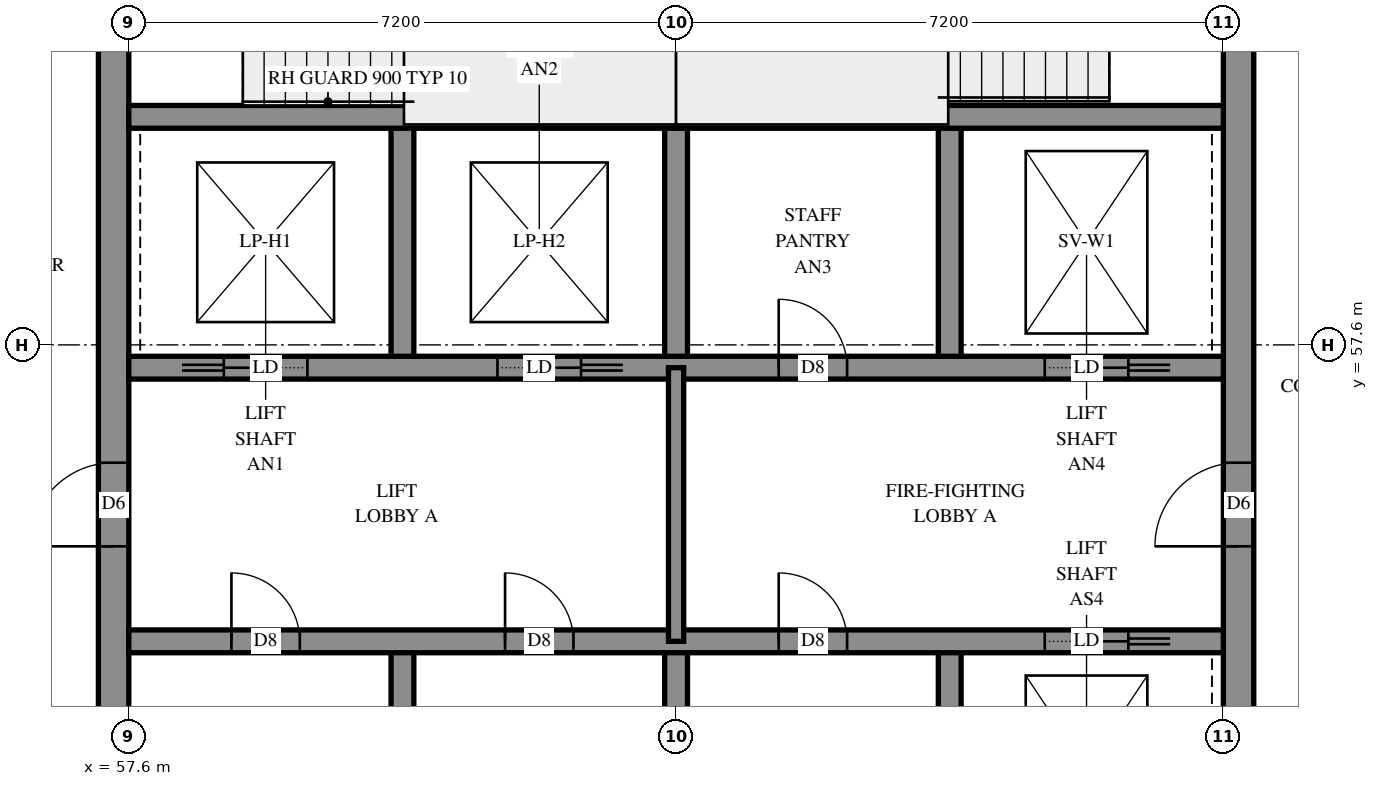
"""IFC4 building model, lengths in metres.
Left out: names, types, materials, properties, quantities, classifications, styles, units other than length and angle.
Written with IfcOpenShell. Run it as: python <this file> out.ifc"""

import sys

from ifc_helpers import new_model, si_unit, direction, frame, frame_2d, origin, place, context, subcontext, project, spatial, rectangle, extrude, element, fill, save


model = new_model("IFC4")
c1 = context("Model", 3, precision=1e-05, world=origin(), true_north=direction((0.0, 1.0)))
c2 = subcontext(c1, "Body", "Model", "MODEL_VIEW")
j1 = project(units=[si_unit("LENGTHUNIT", "METRE"), si_unit("PLANEANGLEUNIT", "RADIAN")], contexts=[c1])
p1 = place(None, origin())
s1 = spatial("IfcSite", under=j1, at=p1, CompositionType="ELEMENT")
p2 = place(p1, origin())
s2 = spatial("IfcBuilding", under=s1, at=p2, CompositionType="ELEMENT")
p3 = place(p2, frame((0.0, 0.0, 243.8)))
s3 = spatial("IfcBuildingStorey", under=s2, at=p3, CompositionType="ELEMENT", Elevation=243.8)
p4 = place(p3, frame((57.4, 50.4, -0.3), z_axis=(0.0, 0.0, 1.0), x_axis=(0.0, 1.0, 0.0)))
e1 = element("IfcWall", 1, at=p4, inside=s3, PredefinedType="SHEAR", context=c2, shape_type="SweptSolid", body=[
    extrude(rectangle(XDim=14.4, YDim=0.4, at=frame_2d((7.2, 0.0))), origin(), (0.0, 0.0, 1.0), 2.7),
])
p5 = place(p4, frame((4.55, 0.0, 0.3)))
e2 = element("IfcOpeningElement", 2, at=p5, cuts=e1, PredefinedType="OPENING", context=c2, shape_type="SweptSolid", body=[
    extrude(rectangle(XDim=1.1, YDim=2.1, at=frame_2d((0.55, 1.05))), frame((0.0, 0.21, 0.0), z_axis=(0.0, -1.0, 0.0), x_axis=(1.0, 0.0, 0.0)), (0.0, 0.0, 1.0), 0.42),
])
p6 = place(p4, frame((11.35, 0.0, 0.3)))
e3 = element("IfcOpeningElement", 3, at=p6, cuts=e1, PredefinedType="OPENING", context=c2, shape_type="SweptSolid", body=[
    extrude(rectangle(XDim=1.1, YDim=2.1, at=frame_2d((0.55, 1.05))), frame((0.0, 0.21, 0.0), z_axis=(0.0, -1.0, 0.0), x_axis=(1.0, 0.0, 0.0)), (0.0, 0.0, 1.0), 0.42),
])
p7 = place(p3, frame((72.2, 50.4, -0.3), z_axis=(0.0, 0.0, 1.0), x_axis=(0.0, 1.0, 0.0)))
e4 = element("IfcWall", 4, at=p7, inside=s3, PredefinedType="SHEAR", context=c2, shape_type="SweptSolid", body=[
    extrude(rectangle(XDim=14.4, YDim=0.4, at=frame_2d((7.2, 0.0))), origin(), (0.0, 0.0, 1.0), 2.7),
])
p8 = place(p7, frame((4.55, 0.0, 0.3)))
e5 = element("IfcOpeningElement", 5, at=p8, cuts=e4, PredefinedType="OPENING", context=c2, shape_type="SweptSolid", body=[
    extrude(rectangle(XDim=1.1, YDim=2.1, at=frame_2d((0.55, 1.05))), frame((0.0, 0.21, 0.0), z_axis=(0.0, -1.0, 0.0), x_axis=(1.0, 0.0, 0.0)), (0.0, 0.0, 1.0), 0.42),
])
p9 = place(p7, frame((11.35, 0.0, 0.3)))
e6 = element("IfcOpeningElement", 6, at=p9, cuts=e4, PredefinedType="OPENING", context=c2, shape_type="SweptSolid", body=[
    extrude(rectangle(XDim=1.1, YDim=2.1, at=frame_2d((0.55, 1.05))), frame((0.0, 0.21, 0.0), z_axis=(0.0, -1.0, 0.0), x_axis=(1.0, 0.0, 0.0)), (0.0, 0.0, 1.0), 0.42),
])
for number, where, z_axis, x_axis in (
    (7, (61.2, 50.4, 0.0), (0.0, 0.0, 1.0), (0.0, 1.0, 0.0)),
    (8, (61.2, 57.3, 0.0), (0.0, 0.0, 1.0), (0.0, 1.0, 0.0)),
    (9, (64.8, 50.4, 0.0), (0.0, 0.0, 1.0), (0.0, 1.0, 0.0)),
    (10, (64.8, 57.3, 0.0), (0.0, 0.0, 1.0), (0.0, 1.0, 0.0)),
    (11, (68.4, 50.4, 0.0), (0.0, 0.0, 1.0), (0.0, 1.0, 0.0)),
    (12, (68.4, 57.3, 0.0), (0.0, 0.0, 1.0), (0.0, 1.0, 0.0)),
):
    element("IfcWall", number, at=place(p3, frame(where, z_axis=z_axis, x_axis=x_axis)), inside=s3, PredefinedType="SOLIDWALL", context=c2, shape_type="SweptSolid", body=[
        extrude(rectangle(XDim=3.3, YDim=0.3, at=frame_2d((1.65, 0.0))), origin(), (0.0, 0.0, 1.0), 3.1),
    ])
p10 = place(p3, frame((57.6, 53.7, 0.0), z_axis=(0.0, 0.0, 1.0), x_axis=(1.0, 0.0, 0.0)))
e13 = element("IfcWall", 13, at=p10, inside=s3, PredefinedType="SOLIDWALL", context=c2, shape_type="SweptSolid", body=[
    extrude(rectangle(XDim=14.4, YDim=0.3, at=frame_2d((7.2, 0.0))), origin(), (0.0, 0.0, 1.0), 3.1),
])
p11 = place(p10, frame((1.35, 0.0, 0.0)))
e14 = element("IfcOpeningElement", 14, at=p11, cuts=e13, PredefinedType="OPENING", context=c2, shape_type="SweptSolid", body=[
    extrude(rectangle(XDim=0.9, YDim=2.1, at=frame_2d((0.45, 1.05))), frame((0.0, 0.16, 0.0), z_axis=(0.0, -1.0, 0.0), x_axis=(1.0, 0.0, 0.0)), (0.0, 0.0, 1.0), 0.32),
])
p12 = place(p10, frame((4.95, 0.0, 0.0)))
e15 = element("IfcOpeningElement", 15, at=p12, cuts=e13, PredefinedType="OPENING", context=c2, shape_type="SweptSolid", body=[
    extrude(rectangle(XDim=0.9, YDim=2.1, at=frame_2d((0.45, 1.05))), frame((0.0, 0.16, 0.0), z_axis=(0.0, -1.0, 0.0), x_axis=(1.0, 0.0, 0.0)), (0.0, 0.0, 1.0), 0.32),
])
p13 = place(p10, frame((8.55, 0.0, 0.0)))
e16 = element("IfcOpeningElement", 16, at=p13, cuts=e13, PredefinedType="OPENING", context=c2, shape_type="SweptSolid", body=[
    extrude(rectangle(XDim=0.9, YDim=2.1, at=frame_2d((0.45, 1.05))), frame((0.0, 0.16, 0.0), z_axis=(0.0, -1.0, 0.0), x_axis=(1.0, 0.0, 0.0)), (0.0, 0.0, 1.0), 0.32),
])
p14 = place(p10, frame((12.05, 0.0, 0.0)))
e17 = element("IfcOpeningElement", 17, at=p14, cuts=e13, PredefinedType="OPENING", context=c2, shape_type="SweptSolid", body=[
    extrude(rectangle(XDim=1.1, YDim=2.1, at=frame_2d((0.55, 1.05))), frame((0.0, 0.16, 0.0), z_axis=(0.0, -1.0, 0.0), x_axis=(1.0, 0.0, 0.0)), (0.0, 0.0, 1.0), 0.32),
])
p15 = place(p3, frame((57.6, 57.3, 0.0), z_axis=(0.0, 0.0, 1.0), x_axis=(1.0, 0.0, 0.0)))
e18 = element("IfcWall", 18, at=p15, inside=s3, PredefinedType="SOLIDWALL", context=c2, shape_type="SweptSolid", body=[
    extrude(rectangle(XDim=14.4, YDim=0.3, at=frame_2d((7.2, 0.0))), origin(), (0.0, 0.0, 1.0), 3.1),
])
p16 = place(p15, frame((8.55, 0.0, 0.0)))
e19 = element("IfcOpeningElement", 19, at=p16, cuts=e18, PredefinedType="OPENING", context=c2, shape_type="SweptSolid", body=[
    extrude(rectangle(XDim=0.9, YDim=2.1, at=frame_2d((0.45, 1.05))), frame((0.0, 0.16, 0.0), z_axis=(0.0, -1.0, 0.0), x_axis=(1.0, 0.0, 0.0)), (0.0, 0.0, 1.0), 0.32),
])
p17 = place(p15, frame((1.25, 0.0, 0.0)))
e20 = element("IfcOpeningElement", 20, at=p17, cuts=e18, PredefinedType="OPENING", context=c2, shape_type="SweptSolid", body=[
    extrude(rectangle(XDim=1.1, YDim=2.1, at=frame_2d((0.55, 1.05))), frame((0.0, 0.16, 0.0), z_axis=(0.0, -1.0, 0.0), x_axis=(1.0, 0.0, 0.0)), (0.0, 0.0, 1.0), 0.32),
])
p18 = place(p15, frame((4.85, 0.0, 0.0)))
e21 = element("IfcOpeningElement", 21, at=p18, cuts=e18, PredefinedType="OPENING", context=c2, shape_type="SweptSolid", body=[
    extrude(rectangle(XDim=1.1, YDim=2.1, at=frame_2d((0.55, 1.05))), frame((0.0, 0.16, 0.0), z_axis=(0.0, -1.0, 0.0), x_axis=(1.0, 0.0, 0.0)), (0.0, 0.0, 1.0), 0.32),
])
p19 = place(p15, frame((12.05, 0.0, 0.0)))
e22 = element("IfcOpeningElement", 22, at=p19, cuts=e18, PredefinedType="OPENING", context=c2, shape_type="SweptSolid", body=[
    extrude(rectangle(XDim=1.1, YDim=2.1, at=frame_2d((0.55, 1.05))), frame((0.0, 0.16, 0.0), z_axis=(0.0, -1.0, 0.0), x_axis=(1.0, 0.0, 0.0)), (0.0, 0.0, 1.0), 0.32),
])
for number, where, z_axis, x_axis in (
    (23, (57.6, 60.6, 0.0), (0.0, 0.0, 1.0), (1.0, 0.0, 0.0)),
    (24, (64.8, 60.6, 0.0), (0.0, 0.0, 1.0), (1.0, 0.0, 0.0)),
):
    element("IfcWall", number, at=place(p3, frame(where, z_axis=z_axis, x_axis=x_axis)), inside=s3, PredefinedType="SOLIDWALL", context=c2, shape_type="SweptSolid", body=[
        extrude(rectangle(XDim=7.2, YDim=0.3, at=frame_2d((3.6, 0.0))), origin(), (0.0, 0.0, 1.0), 3.1),
    ])
p20 = place(p3, frame((64.8, 60.6, 0.0), z_axis=(0.0, 0.0, 1.0), x_axis=(0.0, 1.0, 0.0)))
e25 = element("IfcWall", 25, at=p20, inside=s3, PredefinedType="SOLIDWALL", context=c2, shape_type="SweptSolid", body=[
    extrude(rectangle(XDim=4.2, YDim=0.3, at=frame_2d((2.1, 0.0))), origin(), (0.0, 0.0, 1.0), 3.1),
])
p21 = place(p3, frame((64.8, 53.7, 0.0), z_axis=(0.0, 0.0, 1.0), x_axis=(0.0, 1.0, 0.0)))
e26 = element("IfcWall", 26, at=p21, inside=s3, PredefinedType="PARTITIONING", context=c2, shape_type="SweptSolid", body=[
    extrude(rectangle(XDim=3.6, YDim=0.2, at=frame_2d((1.8, 0.0))), origin(), (0.0, 0.0, 1.0), 3.1),
])
p22 = place(p5, origin())
e27 = element("IfcDoor", 27, at=p22, inside=s3, OperationType="DOUBLE_DOOR_SINGLE_SWING", PredefinedType="DOOR", context=c2, shape_type="SweptSolid", body=[
    extrude(rectangle(XDim=1.1, YDim=2.1, at=frame_2d((0.55, 1.05))), frame((0.0, 0.025, 0.0), z_axis=(0.0, -1.0, 0.0), x_axis=(1.0, 0.0, 0.0)), (0.0, 0.0, 1.0), 0.05),
])
fill(e2, e27)
p23 = place(p8, origin())
e28 = element("IfcDoor", 28, at=p23, inside=s3, OperationType="DOUBLE_DOOR_SINGLE_SWING", PredefinedType="DOOR", context=c2, shape_type="SweptSolid", body=[
    extrude(rectangle(XDim=1.1, YDim=2.1, at=frame_2d((0.55, 1.05))), frame((0.0, 0.025, 0.0), z_axis=(0.0, -1.0, 0.0), x_axis=(1.0, 0.0, 0.0)), (0.0, 0.0, 1.0), 0.05),
])
fill(e5, e28)
p24 = place(p11, origin())
e29 = element("IfcDoor", 29, at=p24, inside=s3, OperationType="SINGLE_SWING_LEFT", PredefinedType="DOOR", context=c2, shape_type="SweptSolid", body=[
    extrude(rectangle(XDim=0.9, YDim=2.1, at=frame_2d((0.45, 1.05))), frame((0.0, 0.025, 0.0), z_axis=(0.0, -1.0, 0.0), x_axis=(1.0, 0.0, 0.0)), (0.0, 0.0, 1.0), 0.05),
])
fill(e14, e29)
p25 = place(p12, origin())
e30 = element("IfcDoor", 30, at=p25, inside=s3, OperationType="SINGLE_SWING_LEFT", PredefinedType="DOOR", context=c2, shape_type="SweptSolid", body=[
    extrude(rectangle(XDim=0.9, YDim=2.1, at=frame_2d((0.45, 1.05))), frame((0.0, 0.025, 0.0), z_axis=(0.0, -1.0, 0.0), x_axis=(1.0, 0.0, 0.0)), (0.0, 0.0, 1.0), 0.05),
])
fill(e15, e30)
p26 = place(p13, origin())
e31 = element("IfcDoor", 31, at=p26, inside=s3, OperationType="SINGLE_SWING_LEFT", PredefinedType="DOOR", context=c2, shape_type="SweptSolid", body=[
    extrude(rectangle(XDim=0.9, YDim=2.1, at=frame_2d((0.45, 1.05))), frame((0.0, 0.025, 0.0), z_axis=(0.0, -1.0, 0.0), x_axis=(1.0, 0.0, 0.0)), (0.0, 0.0, 1.0), 0.05),
])
fill(e16, e31)
p27 = place(p16, origin())
e32 = element("IfcDoor", 32, at=p27, inside=s3, OperationType="SINGLE_SWING_LEFT", PredefinedType="DOOR", context=c2, shape_type="SweptSolid", body=[
    extrude(rectangle(XDim=0.9, YDim=2.1, at=frame_2d((0.45, 1.05))), frame((0.0, 0.025, 0.0), z_axis=(0.0, -1.0, 0.0), x_axis=(1.0, 0.0, 0.0)), (0.0, 0.0, 1.0), 0.05),
])
fill(e19, e32)
p28 = place(p14, origin())
e33 = element("IfcDoor", 33, at=p28, inside=s3, OperationType="SLIDING_TO_RIGHT", PredefinedType="DOOR", context=c2, shape_type="SweptSolid", body=[
    extrude(rectangle(XDim=1.1, YDim=2.1, at=frame_2d((0.55, 1.05))), frame((0.0, 0.025, 0.0), z_axis=(0.0, -1.0, 0.0), x_axis=(1.0, 0.0, 0.0)), (0.0, 0.0, 1.0), 0.05),
])
fill(e17, e33)
p29 = place(p17, origin())
e34 = element("IfcDoor", 34, at=p29, inside=s3, OperationType="SLIDING_TO_LEFT", PredefinedType="DOOR", context=c2, shape_type="SweptSolid", body=[
    extrude(rectangle(XDim=1.1, YDim=2.1, at=frame_2d((0.55, 1.05))), frame((0.0, 0.025, 0.0), z_axis=(0.0, -1.0, 0.0), x_axis=(1.0, 0.0, 0.0)), (0.0, 0.0, 1.0), 0.05),
])
fill(e20, e34)
p30 = place(p18, origin())
e35 = element("IfcDoor", 35, at=p30, inside=s3, OperationType="SLIDING_TO_RIGHT", PredefinedType="DOOR", context=c2, shape_type="SweptSolid", body=[
    extrude(rectangle(XDim=1.1, YDim=2.1, at=frame_2d((0.55, 1.05))), frame((0.0, 0.025, 0.0), z_axis=(0.0, -1.0, 0.0), x_axis=(1.0, 0.0, 0.0)), (0.0, 0.0, 1.0), 0.05),
])
fill(e21, e35)
p31 = place(p19, origin())
e36 = element("IfcDoor", 36, at=p31, inside=s3, OperationType="SLIDING_TO_RIGHT", PredefinedType="DOOR", context=c2, shape_type="SweptSolid", body=[
    extrude(rectangle(XDim=1.1, YDim=2.1, at=frame_2d((0.55, 1.05))), frame((0.0, 0.025, 0.0), z_axis=(0.0, -1.0, 0.0), x_axis=(1.0, 0.0, 0.0)), (0.0, 0.0, 1.0), 0.05),
])
fill(e22, e36)
save(model, sys.argv[1])
